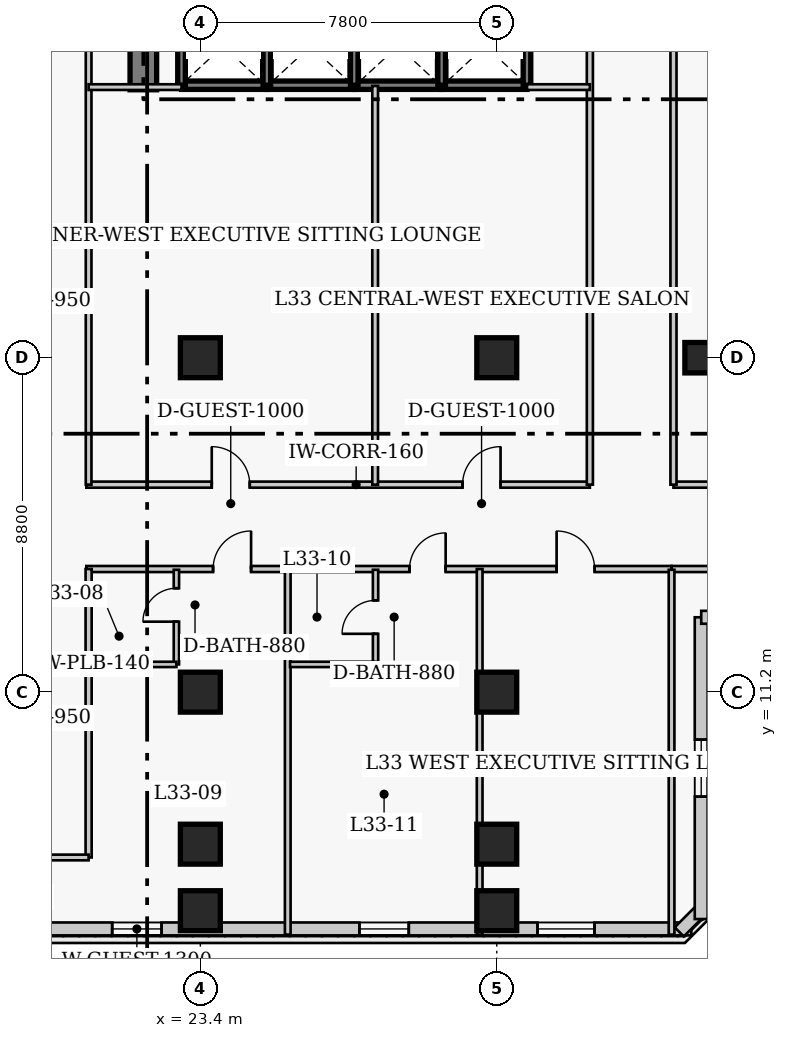
"""IFC4 building model, lengths in metres.
Left out: names, types, materials, properties, quantities, classifications, styles, units other than length and angle.
Written with IfcOpenShell. Run it as: python <this file> out.ifc"""

import sys

from ifc_helpers import new_model, si_unit, direction, frame, frame_2d, origin, origin_2d, place, context, subcontext, project, spatial, rectangle, extrude, element, fill, save


model = new_model("IFC4")
c1 = context("Model", 3, precision=1e-05, world=origin(), true_north=direction((0.0, 1.0)))
c2 = subcontext(c1, "Body", "Model", "MODEL_VIEW")
j1 = project(units=[si_unit("LENGTHUNIT", "METRE"), si_unit("PLANEANGLEUNIT", "RADIAN")], contexts=[c1])
p1 = place(None, origin())
s1 = spatial("IfcSite", under=j1, at=p1, CompositionType="ELEMENT")
p2 = place(p1, origin())
s2 = spatial("IfcBuilding", under=s1, at=p2, CompositionType="ELEMENT")
p3 = place(p2, frame((0.0, 0.0, 134.6)))
s3 = spatial("IfcBuildingStorey", under=s2, at=p3, CompositionType="ELEMENT", Elevation=134.6)
p4 = place(p3, frame((21.9, 27.05, 0.0), z_axis=(0.0, 0.0, 1.0), x_axis=(0.0, 1.0, 0.0)))
e1 = element("IfcWall", 1, at=p4, inside=s3, PredefinedType="SHEAR", context=c2, shape_type="SweptSolid", body=[
    extrude(rectangle(XDim=13.62, YDim=0.7, at=frame_2d((6.81, 0.0))), origin(), (0.0, 0.0, 1.0), 3.8),
])
for number, where, z_axis, x_axis in (
    (2, (23.4, 11.2, 0.0), (0.0, 0.0, 1.0), (1.0, 0.0, 0.0)),
    (3, (23.4, 20.0, 0.0), (0.0, 0.0, 1.0), (1.0, 0.0, 0.0)),
    (4, (31.2, 11.2, 0.0), (0.0, 0.0, 1.0), (1.0, 0.0, 0.0)),
    (5, (31.2, 20.0, 0.0), (0.0, 0.0, 1.0), (1.0, 0.0, 0.0)),
):
    element("IfcColumn", number, at=place(p3, frame(where, z_axis=z_axis, x_axis=x_axis)), inside=s3, PredefinedType="COLUMN", context=c2, shape_type="SweptSolid", body=[
        extrude(rectangle(XDim=1.05, YDim=1.05, at=origin_2d()), origin(), (0.0, 0.0, 1.0), 3.8),
    ])
p5 = place(p3, frame((36.75, 20.0, 0.0), z_axis=(0.0, 0.0, 1.0), x_axis=(1.0, 0.0, 0.0)))
e6 = element("IfcColumn", 6, at=p5, inside=s3, PredefinedType="COLUMN", context=c2, shape_type="SweptSolid", body=[
    extrude(rectangle(XDim=1.2, YDim=0.8, at=origin_2d()), origin(), (0.0, 0.0, 1.0), 3.8),
])
for number, where, z_axis, x_axis in (
    (7, (23.4, 7.2, 0.0), (0.0, 0.0, 1.0), (1.0, 0.0, 0.0)),
    (8, (31.2, 7.2, 0.0), (0.0, 0.0, 1.0), (1.0, 0.0, 0.0)),
    (9, (23.4, 5.45, 0.0), (0.0, 0.0, 1.0), (1.0, 0.0, 0.0)),
    (10, (31.2, 5.45, 0.0), (0.0, 0.0, 1.0), (1.0, 0.0, 0.0)),
):
    element("IfcColumn", number, at=place(p3, frame(where, z_axis=z_axis, x_axis=x_axis)), inside=s3, PredefinedType="COLUMN", context=c2, shape_type="SweptSolid", body=[
        extrude(rectangle(XDim=1.05, YDim=1.05, at=origin_2d()), origin(), (0.0, 0.0, 1.0), 3.8),
    ])
p6 = place(p3, frame((9.63, 4.97, 0.0), z_axis=(0.0, 0.0, 1.0), x_axis=(1.0, 0.0, 0.0)))
e11 = element("IfcWall", 11, at=p6, inside=s3, PredefinedType="SOLIDWALL", context=c2, shape_type="SweptSolid", body=[
    extrude(rectangle(XDim=26.69, YDim=0.34, at=frame_2d((13.345, 0.0))), origin(), (0.0, 0.0, 1.0), 3.55),
])
p7 = place(p6, frame((3.048, 0.0, 0.85)))
e12 = element("IfcOpeningElement", 12, at=p7, cuts=e11, PredefinedType="OPENING", context=c2, shape_type="SweptSolid", body=[
    extrude(rectangle(XDim=1.5, YDim=1.75, at=frame_2d((0.75, 0.875))), frame((0.0, 0.18, 0.0), z_axis=(0.0, -1.0, 0.0), x_axis=(1.0, 0.0, 0.0)), (0.0, 0.0, 1.0), 0.36),
])
p8 = place(p6, frame((22.642, 0.0, 0.85)))
e13 = element("IfcOpeningElement", 13, at=p8, cuts=e11, PredefinedType="OPENING", context=c2, shape_type="SweptSolid", body=[
    extrude(rectangle(XDim=1.5, YDim=1.75, at=frame_2d((0.75, 0.875))), frame((0.0, 0.18, 0.0), z_axis=(0.0, -1.0, 0.0), x_axis=(1.0, 0.0, 0.0)), (0.0, 0.0, 1.0), 0.36),
])
p9 = place(p6, frame((11.45, 0.0, 0.85)))
e14 = element("IfcOpeningElement", 14, at=p9, cuts=e11, PredefinedType="OPENING", context=c2, shape_type="SweptSolid", body=[
    extrude(rectangle(XDim=1.3, YDim=1.7, at=frame_2d((0.65, 0.85))), frame((0.0, 0.18, 0.0), z_axis=(0.0, -1.0, 0.0), x_axis=(1.0, 0.0, 0.0)), (0.0, 0.0, 1.0), 0.36),
])
p10 = place(p6, frame((17.955, 0.0, 0.85)))
e15 = element("IfcOpeningElement", 15, at=p10, cuts=e11, PredefinedType="OPENING", context=c2, shape_type="SweptSolid", body=[
    extrude(rectangle(XDim=1.3, YDim=1.7, at=frame_2d((0.65, 0.85))), frame((0.0, 0.18, 0.0), z_axis=(0.0, -1.0, 0.0), x_axis=(1.0, 0.0, 0.0)), (0.0, 0.0, 1.0), 0.36),
])
p11 = place(p3, frame((36.001, 4.892, 0.0), z_axis=(0.0, 0.0, 1.0), x_axis=(0.707106781187, 0.707106781187, 0.0)))
e16 = element("IfcWall", 16, at=p11, inside=s3, PredefinedType="SOLIDWALL", context=c2, shape_type="SweptSolid", body=[
    extrude(rectangle(XDim=0.929, YDim=0.34, at=frame_2d((0.464, 0.0))), origin(), (0.0, 0.0, 1.0), 3.55),
])
p12 = place(p3, frame((36.58, 5.23, 0.0), z_axis=(0.0, 0.0, 1.0), x_axis=(0.0, 1.0, 0.0)))
e17 = element("IfcWall", 17, at=p12, inside=s3, PredefinedType="SOLIDWALL", context=c2, shape_type="SweptSolid", body=[
    extrude(rectangle(XDim=7.94, YDim=0.34, at=frame_2d((3.97, 0.0))), origin(), (0.0, 0.0, 1.0), 3.55),
])
p13 = place(p12, frame((3.22, 0.0, 0.85)))
e18 = element("IfcOpeningElement", 18, at=p13, cuts=e17, PredefinedType="OPENING", context=c2, shape_type="SweptSolid", body=[
    extrude(rectangle(XDim=1.5, YDim=1.75, at=frame_2d((0.75, 0.875))), frame((0.0, 0.18, 0.0), z_axis=(0.0, -1.0, 0.0), x_axis=(1.0, 0.0, 0.0)), (0.0, 0.0, 1.0), 0.36),
])
p14 = place(p3, frame((36.58, 13.17, 0.0), z_axis=(0.0, 0.0, 1.0), x_axis=(1.0, 0.0, 0.0)))
e19 = element("IfcWall", 19, at=p14, inside=s3, PredefinedType="SOLIDWALL", context=c2, shape_type="SweptSolid", body=[
    extrude(rectangle(XDim=4.84, YDim=0.34, at=frame_2d((2.42, 0.0))), origin(), (0.0, 0.0, 1.0), 3.55),
])
p15 = place(p14, frame((1.67, 0.0, 0.85)))
e20 = element("IfcOpeningElement", 20, at=p15, cuts=e19, PredefinedType="OPENING", context=c2, shape_type="SweptSolid", body=[
    extrude(rectangle(XDim=1.5, YDim=1.75, at=frame_2d((0.75, 0.875))), frame((0.0, 0.18, 0.0), z_axis=(0.0, -1.0, 0.0), x_axis=(1.0, 0.0, 0.0)), (0.0, 0.0, 1.0), 0.36),
])
p16 = place(p3, frame((22.905, 27.17, 0.0), z_axis=(0.0, 0.0, 1.0), x_axis=(1.0, 0.0, 0.0)))
e21 = element("IfcWall", 21, at=p16, inside=s3, PredefinedType="SHEAR", context=c2, shape_type="SweptSolid", body=[
    extrude(rectangle(XDim=2.245, YDim=0.22, at=frame_2d((1.123, 0.0))), origin(), (0.0, 0.0, 1.0), 3.8),
])
p17 = place(p3, frame((22.905, 27.17, 0.0), z_axis=(0.0, 0.0, 1.0), x_axis=(0.0, 1.0, 0.0)))
e22 = element("IfcWall", 22, at=p17, inside=s3, PredefinedType="SHEAR", context=c2, shape_type="SweptSolid", body=[
    extrude(rectangle(XDim=2.06, YDim=0.2, at=frame_2d((1.03, 0.0))), origin(), (0.0, 0.0, 1.0), 3.8),
])
p18 = place(p3, frame((25.15, 27.17, 0.0), z_axis=(0.0, 0.0, 1.0), x_axis=(1.0, 0.0, 0.0)))
e23 = element("IfcWall", 23, at=p18, inside=s3, PredefinedType="SHEAR", context=c2, shape_type="SweptSolid", body=[
    extrude(rectangle(XDim=2.3, YDim=0.22, at=frame_2d((1.15, 0.0))), origin(), (0.0, 0.0, 1.0), 3.8),
])
p19 = place(p3, frame((25.15, 27.17, 0.0), z_axis=(0.0, 0.0, 1.0), x_axis=(0.0, 1.0, 0.0)))
e24 = element("IfcWall", 24, at=p19, inside=s3, PredefinedType="SHEAR", context=c2, shape_type="SweptSolid", body=[
    extrude(rectangle(XDim=2.06, YDim=0.2, at=frame_2d((1.03, 0.0))), origin(), (0.0, 0.0, 1.0), 3.8),
])
p20 = place(p3, frame((27.45, 27.17, 0.0), z_axis=(0.0, 0.0, 1.0), x_axis=(1.0, 0.0, 0.0)))
e25 = element("IfcWall", 25, at=p20, inside=s3, PredefinedType="SHEAR", context=c2, shape_type="SweptSolid", body=[
    extrude(rectangle(XDim=2.3, YDim=0.22, at=frame_2d((1.15, 0.0))), origin(), (0.0, 0.0, 1.0), 3.8),
])
p21 = place(p3, frame((27.45, 27.17, 0.0), z_axis=(0.0, 0.0, 1.0), x_axis=(0.0, 1.0, 0.0)))
e26 = element("IfcWall", 26, at=p21, inside=s3, PredefinedType="SHEAR", context=c2, shape_type="SweptSolid", body=[
    extrude(rectangle(XDim=2.06, YDim=0.2, at=frame_2d((1.03, 0.0))), origin(), (0.0, 0.0, 1.0), 3.8),
])
p22 = place(p3, frame((29.75, 27.17, 0.0), z_axis=(0.0, 0.0, 1.0), x_axis=(1.0, 0.0, 0.0)))
e27 = element("IfcWall", 27, at=p22, inside=s3, PredefinedType="SHEAR", context=c2, shape_type="SweptSolid", body=[
    extrude(rectangle(XDim=2.245, YDim=0.22, at=frame_2d((1.123, 0.0))), origin(), (0.0, 0.0, 1.0), 3.8),
])
for number, where, z_axis, x_axis in (
    (28, (29.75, 27.17, 0.0), (0.0, 0.0, 1.0), (0.0, 1.0, 0.0)),
    (29, (31.995, 27.17, 0.0), (0.0, 0.0, 1.0), (0.0, 1.0, 0.0)),
):
    element("IfcWall", number, at=place(p3, frame(where, z_axis=z_axis, x_axis=x_axis)), inside=s3, PredefinedType="SHEAR", context=c2, shape_type="SweptSolid", body=[
        extrude(rectangle(XDim=2.06, YDim=0.2, at=frame_2d((1.03, 0.0))), origin(), (0.0, 0.0, 1.0), 3.8),
    ])
p23 = place(p3, frame((20.4, 16.66, 0.0), z_axis=(0.0, 0.0, 1.0), x_axis=(1.0, 0.0, 0.0)))
e30 = element("IfcWall", 30, at=p23, inside=s3, PredefinedType="PARTITIONING", context=c2, shape_type="SweptSolid", body=[
    extrude(rectangle(XDim=13.25, YDim=0.16, at=frame_2d((6.625, 0.0))), origin(), (0.0, 0.0, 1.0), 3.55),
])
p24 = place(p23, frame((3.3, 0.0, 0.0)))
e31 = element("IfcOpeningElement", 31, at=p24, cuts=e30, PredefinedType="OPENING", context=c2, shape_type="SweptSolid", body=[
    extrude(rectangle(XDim=1.0, YDim=2.15, at=frame_2d((0.5, 1.075))), frame((0.0, 0.09, 0.0), z_axis=(0.0, -1.0, 0.0), x_axis=(1.0, 0.0, 0.0)), (0.0, 0.0, 1.0), 0.18),
])
p25 = place(p23, frame((9.9, 0.0, 0.0)))
e32 = element("IfcOpeningElement", 32, at=p25, cuts=e30, PredefinedType="OPENING", context=c2, shape_type="SweptSolid", body=[
    extrude(rectangle(XDim=1.0, YDim=2.15, at=frame_2d((0.5, 1.075))), frame((0.0, 0.09, 0.0), z_axis=(0.0, -1.0, 0.0), x_axis=(1.0, 0.0, 0.0)), (0.0, 0.0, 1.0), 0.18),
])
p26 = place(p3, frame((35.85, 16.66, 0.0), z_axis=(0.0, 0.0, 1.0), x_axis=(1.0, 0.0, 0.0)))
e33 = element("IfcWall", 33, at=p26, inside=s3, PredefinedType="PARTITIONING", context=c2, shape_type="SweptSolid", body=[
    extrude(rectangle(XDim=22.8, YDim=0.16, at=frame_2d((11.4, 0.0))), origin(), (0.0, 0.0, 1.0), 3.55),
])
p27 = place(p26, frame((9.65, 0.0, 0.0)))
e34 = element("IfcOpeningElement", 34, at=p27, cuts=e33, PredefinedType="OPENING", context=c2, shape_type="SweptSolid", body=[
    extrude(rectangle(XDim=1.0, YDim=2.15, at=frame_2d((0.5, 1.075))), frame((0.0, 0.09, 0.0), z_axis=(0.0, -1.0, 0.0), x_axis=(1.0, 0.0, 0.0)), (0.0, 0.0, 1.0), 0.18),
])
p28 = place(p26, frame((18.05, 0.0, 0.0)))
e35 = element("IfcOpeningElement", 35, at=p28, cuts=e33, PredefinedType="OPENING", context=c2, shape_type="SweptSolid", body=[
    extrude(rectangle(XDim=1.0, YDim=2.15, at=frame_2d((0.5, 1.075))), frame((0.0, 0.09, 0.0), z_axis=(0.0, -1.0, 0.0), x_axis=(1.0, 0.0, 0.0)), (0.0, 0.0, 1.0), 0.18),
])
for number, where, z_axis, x_axis in (
    (36, (33.65, 16.66, 0.0), (0.0, 0.0, 1.0), (0.0, 1.0, 0.0)),
    (37, (35.85, 16.66, 0.0), (0.0, 0.0, 1.0), (0.0, 1.0, 0.0)),
):
    element("IfcWall", number, at=place(p3, frame(where, z_axis=z_axis, x_axis=x_axis)), inside=s3, PredefinedType="PARTITIONING", context=c2, shape_type="SweptSolid", body=[
        extrude(rectangle(XDim=12.89, YDim=0.16, at=frame_2d((6.445, 0.0))), origin(), (0.0, 0.0, 1.0), 3.55),
    ])
p29 = place(p3, frame((20.4, 14.44, 0.0), z_axis=(0.0, 0.0, 1.0), x_axis=(1.0, 0.0, 0.0)))
e38 = element("IfcWall", 38, at=p29, inside=s3, PredefinedType="PARTITIONING", context=c2, shape_type="SweptSolid", body=[
    extrude(rectangle(XDim=15.4, YDim=0.16, at=frame_2d((7.7, 0.0))), origin(), (0.0, 0.0, 1.0), 3.55),
])
p30 = place(p29, frame((3.335, 0.0, 0.0)))
e39 = element("IfcOpeningElement", 39, at=p30, cuts=e38, PredefinedType="OPENING", context=c2, shape_type="SweptSolid", body=[
    extrude(rectangle(XDim=1.0, YDim=2.15, at=frame_2d((0.5, 1.075))), frame((0.0, 0.09, 0.0), z_axis=(0.0, -1.0, 0.0), x_axis=(1.0, 0.0, 0.0)), (0.0, 0.0, 1.0), 0.18),
])
p31 = place(p29, frame((8.505, 0.0, 0.0)))
e40 = element("IfcOpeningElement", 40, at=p31, cuts=e38, PredefinedType="OPENING", context=c2, shape_type="SweptSolid", body=[
    extrude(rectangle(XDim=0.95, YDim=2.1, at=frame_2d((0.475, 1.05))), frame((0.0, 0.09, 0.0), z_axis=(0.0, -1.0, 0.0), x_axis=(1.0, 0.0, 0.0)), (0.0, 0.0, 1.0), 0.18),
])
p32 = place(p29, frame((12.375, 0.0, 0.0)))
e41 = element("IfcOpeningElement", 41, at=p32, cuts=e38, PredefinedType="OPENING", context=c2, shape_type="SweptSolid", body=[
    extrude(rectangle(XDim=1.0, YDim=2.15, at=frame_2d((0.5, 1.075))), frame((0.0, 0.09, 0.0), z_axis=(0.0, -1.0, 0.0), x_axis=(1.0, 0.0, 0.0)), (0.0, 0.0, 1.0), 0.18),
])
p33 = place(p3, frame((35.8, 14.44, 0.0), z_axis=(0.0, 0.0, 1.0), x_axis=(1.0, 0.0, 0.0)))
e42 = element("IfcWall", 42, at=p33, inside=s3, PredefinedType="PARTITIONING", context=c2, shape_type="SweptSolid", body=[
    extrude(rectangle(XDim=22.85, YDim=0.16, at=frame_2d((11.425, 0.0))), origin(), (0.0, 0.0, 1.0), 3.55),
])
p34 = place(p33, frame((8.046, 0.0, 0.0)))
e43 = element("IfcOpeningElement", 43, at=p34, cuts=e42, PredefinedType="OPENING", context=c2, shape_type="SweptSolid", body=[
    extrude(rectangle(XDim=1.0, YDim=2.15, at=frame_2d((0.5, 1.075))), frame((0.0, 0.09, 0.0), z_axis=(0.0, -1.0, 0.0), x_axis=(1.0, 0.0, 0.0)), (0.0, 0.0, 1.0), 0.18),
])
p35 = place(p3, frame((20.46, 6.85, 0.0), z_axis=(0.0, 0.0, 1.0), x_axis=(0.0, 1.0, 0.0)))
e44 = element("IfcWall", 44, at=p35, inside=s3, PredefinedType="PARTITIONING", context=c2, shape_type="SweptSolid", body=[
    extrude(rectangle(XDim=7.59, YDim=0.16, at=frame_2d((3.795, 0.0))), origin(), (0.0, 0.0, 1.0), 3.55),
])
p36 = place(p3, frame((18.24, 6.85, 0.0), z_axis=(0.0, 0.0, 1.0), x_axis=(1.0, 0.0, 0.0)))
e45 = element("IfcWall", 45, at=p36, inside=s3, PredefinedType="PARTITIONING", context=c2, shape_type="SweptSolid", body=[
    extrude(rectangle(XDim=2.22, YDim=0.15, at=frame_2d((1.11, 0.0))), origin(), (0.0, 0.0, 1.0), 3.55),
])
p37 = place(p3, frame((20.46, 16.66, 0.0), z_axis=(0.0, 0.0, 1.0), x_axis=(0.0, 1.0, 0.0)))
e46 = element("IfcWall", 46, at=p37, inside=s3, PredefinedType="PARTITIONING", context=c2, shape_type="SweptSolid", body=[
    extrude(rectangle(XDim=16.14, YDim=0.15, at=frame_2d((8.07, 0.0))), origin(), (0.0, 0.0, 1.0), 3.55),
])
p38 = place(p3, frame((28.0, 16.66, 0.0), z_axis=(0.0, 0.0, 1.0), x_axis=(0.0, 1.0, 0.0)))
e47 = element("IfcWall", 47, at=p38, inside=s3, PredefinedType="PARTITIONING", context=c2, shape_type="SweptSolid", body=[
    extrude(rectangle(XDim=10.49, YDim=0.15, at=frame_2d((5.245, 0.0))), origin(), (0.0, 0.0, 1.0), 3.55),
])
p39 = place(p3, frame((20.46, 27.12, 0.0), z_axis=(0.0, 0.0, 1.0), x_axis=(1.0, 0.0, 0.0)))
e48 = element("IfcWall", 48, at=p39, inside=s3, PredefinedType="PARTITIONING", context=c2, shape_type="SweptSolid", body=[
    extrude(rectangle(XDim=2.445, YDim=0.15, at=frame_2d((1.223, 0.0))), origin(), (0.0, 0.0, 1.0), 3.55),
])
p40 = place(p3, frame((31.995, 27.12, 0.0), z_axis=(0.0, 0.0, 1.0), x_axis=(1.0, 0.0, 0.0)))
e49 = element("IfcWall", 49, at=p40, inside=s3, PredefinedType="PARTITIONING", context=c2, shape_type="SweptSolid", body=[
    extrude(rectangle(XDim=1.655, YDim=0.15, at=frame_2d((0.827, 0.0))), origin(), (0.0, 0.0, 1.0), 3.55),
])
p41 = place(p3, frame((22.77, 11.93, 0.0), z_axis=(0.0, 0.0, 1.0), x_axis=(0.0, 1.0, 0.0)))
e50 = element("IfcWall", 50, at=p41, inside=s3, PredefinedType="PLUMBINGWALL", context=c2, shape_type="SweptSolid", body=[
    extrude(rectangle(XDim=2.49, YDim=0.14, at=frame_2d((1.245, 0.0))), origin(), (0.0, 0.0, 1.0), 3.55),
])
p42 = place(p41, frame((1.125, 0.0, 0.0)))
e51 = element("IfcOpeningElement", 51, at=p42, cuts=e50, PredefinedType="OPENING", context=c2, shape_type="SweptSolid", body=[
    extrude(rectangle(XDim=0.88, YDim=2.05, at=frame_2d((0.44, 1.025))), frame((0.0, 0.08, 0.0), z_axis=(0.0, -1.0, 0.0), x_axis=(1.0, 0.0, 0.0)), (0.0, 0.0, 1.0), 0.16),
])
p43 = place(p3, frame((20.52, 11.93, 0.0), z_axis=(0.0, 0.0, 1.0), x_axis=(1.0, 0.0, 0.0)))
e52 = element("IfcWall", 52, at=p43, inside=s3, PredefinedType="PLUMBINGWALL", context=c2, shape_type="SweptSolid", body=[
    extrude(rectangle(XDim=2.25, YDim=0.14, at=frame_2d((1.125, 0.0))), origin(), (0.0, 0.0, 1.0), 3.55),
])
p44 = place(p3, frame((25.7, 4.82, 0.0), z_axis=(0.0, 0.0, 1.0), x_axis=(0.0, 1.0, 0.0)))
e53 = element("IfcWall", 53, at=p44, inside=s3, PredefinedType="PARTITIONING", context=c2, shape_type="SweptSolid", body=[
    extrude(rectangle(XDim=9.62, YDim=0.15, at=frame_2d((4.81, 0.0))), origin(), (0.0, 0.0, 1.0), 3.55),
])
p45 = place(p3, frame((28.01, 11.93, 0.0), z_axis=(0.0, 0.0, 1.0), x_axis=(0.0, 1.0, 0.0)))
e54 = element("IfcWall", 54, at=p45, inside=s3, PredefinedType="PLUMBINGWALL", context=c2, shape_type="SweptSolid", body=[
    extrude(rectangle(XDim=2.49, YDim=0.14, at=frame_2d((1.245, 0.0))), origin(), (0.0, 0.0, 1.0), 3.55),
])
p46 = place(p45, frame((0.805, 0.0, 0.0)))
e55 = element("IfcOpeningElement", 55, at=p46, cuts=e54, PredefinedType="OPENING", context=c2, shape_type="SweptSolid", body=[
    extrude(rectangle(XDim=0.88, YDim=2.05, at=frame_2d((0.44, 1.025))), frame((0.0, 0.08, 0.0), z_axis=(0.0, -1.0, 0.0), x_axis=(1.0, 0.0, 0.0)), (0.0, 0.0, 1.0), 0.16),
])
p47 = place(p3, frame((25.76, 11.93, 0.0), z_axis=(0.0, 0.0, 1.0), x_axis=(1.0, 0.0, 0.0)))
e56 = element("IfcWall", 56, at=p47, inside=s3, PredefinedType="PLUMBINGWALL", context=c2, shape_type="SweptSolid", body=[
    extrude(rectangle(XDim=2.25, YDim=0.14, at=frame_2d((1.125, 0.0))), origin(), (0.0, 0.0, 1.0), 3.55),
])
p48 = place(p3, frame((30.75, 4.82, 0.0), z_axis=(0.0, 0.0, 1.0), x_axis=(0.0, 1.0, 0.0)))
e57 = element("IfcWall", 57, at=p48, inside=s3, PredefinedType="PARTITIONING", context=c2, shape_type="SweptSolid", body=[
    extrude(rectangle(XDim=9.62, YDim=0.15, at=frame_2d((4.81, 0.0))), origin(), (0.0, 0.0, 1.0), 3.55),
])
p49 = place(p3, frame((35.8, 4.82, 0.0), z_axis=(0.0, 0.0, 1.0), x_axis=(0.0, 1.0, 0.0)))
e58 = element("IfcWall", 58, at=p49, inside=s3, PredefinedType="PARTITIONING", context=c2, shape_type="SweptSolid", body=[
    extrude(rectangle(XDim=9.6, YDim=0.15, at=frame_2d((4.8, 0.0))), origin(), (0.0, 0.0, 1.0), 3.55),
])
p50 = place(p8, origin())
e59 = element("IfcWindow", 59, at=p50, inside=s3, PartitioningType="SINGLE_PANEL", PredefinedType="WINDOW", context=c2, shape_type="SweptSolid", body=[
    extrude(rectangle(XDim=1.5, YDim=1.75, at=frame_2d((0.75, 0.875))), frame((0.0, 0.03, 0.0), z_axis=(0.0, -1.0, 0.0), x_axis=(1.0, 0.0, 0.0)), (0.0, 0.0, 1.0), 0.06),
])
fill(e13, e59)
p51 = place(p13, origin())
e60 = element("IfcWindow", 60, at=p51, inside=s3, PartitioningType="SINGLE_PANEL", PredefinedType="WINDOW", context=c2, shape_type="SweptSolid", body=[
    extrude(rectangle(XDim=1.5, YDim=1.75, at=frame_2d((0.75, 0.875))), frame((0.0, 0.03, 0.0), z_axis=(0.0, -1.0, 0.0), x_axis=(1.0, 0.0, 0.0)), (0.0, 0.0, 1.0), 0.06),
])
fill(e18, e60)
p52 = place(p9, origin())
e61 = element("IfcWindow", 61, at=p52, inside=s3, PartitioningType="SINGLE_PANEL", PredefinedType="WINDOW", context=c2, shape_type="SweptSolid", body=[
    extrude(rectangle(XDim=1.3, YDim=1.7, at=frame_2d((0.65, 0.85))), frame((0.0, 0.03, 0.0), z_axis=(0.0, -1.0, 0.0), x_axis=(1.0, 0.0, 0.0)), (0.0, 0.0, 1.0), 0.06),
])
fill(e14, e61)
p53 = place(p10, origin())
e62 = element("IfcWindow", 62, at=p53, inside=s3, PartitioningType="SINGLE_PANEL", PredefinedType="WINDOW", context=c2, shape_type="SweptSolid", body=[
    extrude(rectangle(XDim=1.3, YDim=1.7, at=frame_2d((0.65, 0.85))), frame((0.0, 0.03, 0.0), z_axis=(0.0, -1.0, 0.0), x_axis=(1.0, 0.0, 0.0)), (0.0, 0.0, 1.0), 0.06),
])
fill(e15, e62)
p54 = place(p24, origin())
e63 = element("IfcDoor", 63, at=p54, inside=s3, OperationType="SINGLE_SWING_LEFT", PredefinedType="DOOR", context=c2, shape_type="SweptSolid", body=[
    extrude(rectangle(XDim=1.0, YDim=2.15, at=frame_2d((0.5, 1.075))), frame((0.0, 0.025, 0.0), z_axis=(0.0, -1.0, 0.0), x_axis=(1.0, 0.0, 0.0)), (0.0, 0.0, 1.0), 0.05),
])
fill(e31, e63)
p55 = place(p25, origin())
e64 = element("IfcDoor", 64, at=p55, inside=s3, OperationType="SINGLE_SWING_RIGHT", PredefinedType="DOOR", context=c2, shape_type="SweptSolid", body=[
    extrude(rectangle(XDim=1.0, YDim=2.15, at=frame_2d((0.5, 1.075))), frame((0.0, 0.025, 0.0), z_axis=(0.0, -1.0, 0.0), x_axis=(1.0, 0.0, 0.0)), (0.0, 0.0, 1.0), 0.05),
])
fill(e32, e64)
p56 = place(p42, origin())
e65 = element("IfcDoor", 65, at=p56, inside=s3, OperationType="SINGLE_SWING_LEFT", PredefinedType="DOOR", context=c2, shape_type="SweptSolid", body=[
    extrude(rectangle(XDim=0.88, YDim=2.05, at=frame_2d((0.44, 1.025))), frame((0.0, 0.025, 0.0), z_axis=(0.0, -1.0, 0.0), x_axis=(1.0, 0.0, 0.0)), (0.0, 0.0, 1.0), 0.05),
])
fill(e51, e65)
p57 = place(p30, origin())
e66 = element("IfcDoor", 66, at=p57, inside=s3, OperationType="SINGLE_SWING_RIGHT", PredefinedType="DOOR", context=c2, shape_type="SweptSolid", body=[
    extrude(rectangle(XDim=1.0, YDim=2.15, at=frame_2d((0.5, 1.075))), frame((0.0, 0.025, 0.0), z_axis=(0.0, -1.0, 0.0), x_axis=(1.0, 0.0, 0.0)), (0.0, 0.0, 1.0), 0.05),
])
fill(e39, e66)
p58 = place(p46, origin())
e67 = element("IfcDoor", 67, at=p58, inside=s3, OperationType="SINGLE_SWING_LEFT", PredefinedType="DOOR", context=c2, shape_type="SweptSolid", body=[
    extrude(rectangle(XDim=0.88, YDim=2.05, at=frame_2d((0.44, 1.025))), frame((0.0, 0.025, 0.0), z_axis=(0.0, -1.0, 0.0), x_axis=(1.0, 0.0, 0.0)), (0.0, 0.0, 1.0), 0.05),
])
fill(e55, e67)
p59 = place(p31, origin())
e68 = element("IfcDoor", 68, at=p59, inside=s3, OperationType="SINGLE_SWING_RIGHT", PredefinedType="DOOR", context=c2, shape_type="SweptSolid", body=[
    extrude(rectangle(XDim=0.95, YDim=2.1, at=frame_2d((0.475, 1.05))), frame((0.0, 0.025, 0.0), z_axis=(0.0, -1.0, 0.0), x_axis=(1.0, 0.0, 0.0)), (0.0, 0.0, 1.0), 0.05),
])
fill(e40, e68)
p60 = place(p32, origin())
e69 = element("IfcDoor", 69, at=p60, inside=s3, OperationType="SINGLE_SWING_LEFT", PredefinedType="DOOR", context=c2, shape_type="SweptSolid", body=[
    extrude(rectangle(XDim=1.0, YDim=2.15, at=frame_2d((0.5, 1.075))), frame((0.0, 0.025, 0.0), z_axis=(0.0, -1.0, 0.0), x_axis=(1.0, 0.0, 0.0)), (0.0, 0.0, 1.0), 0.05),
])
fill(e41, e69)
save(model, sys.argv[1])
